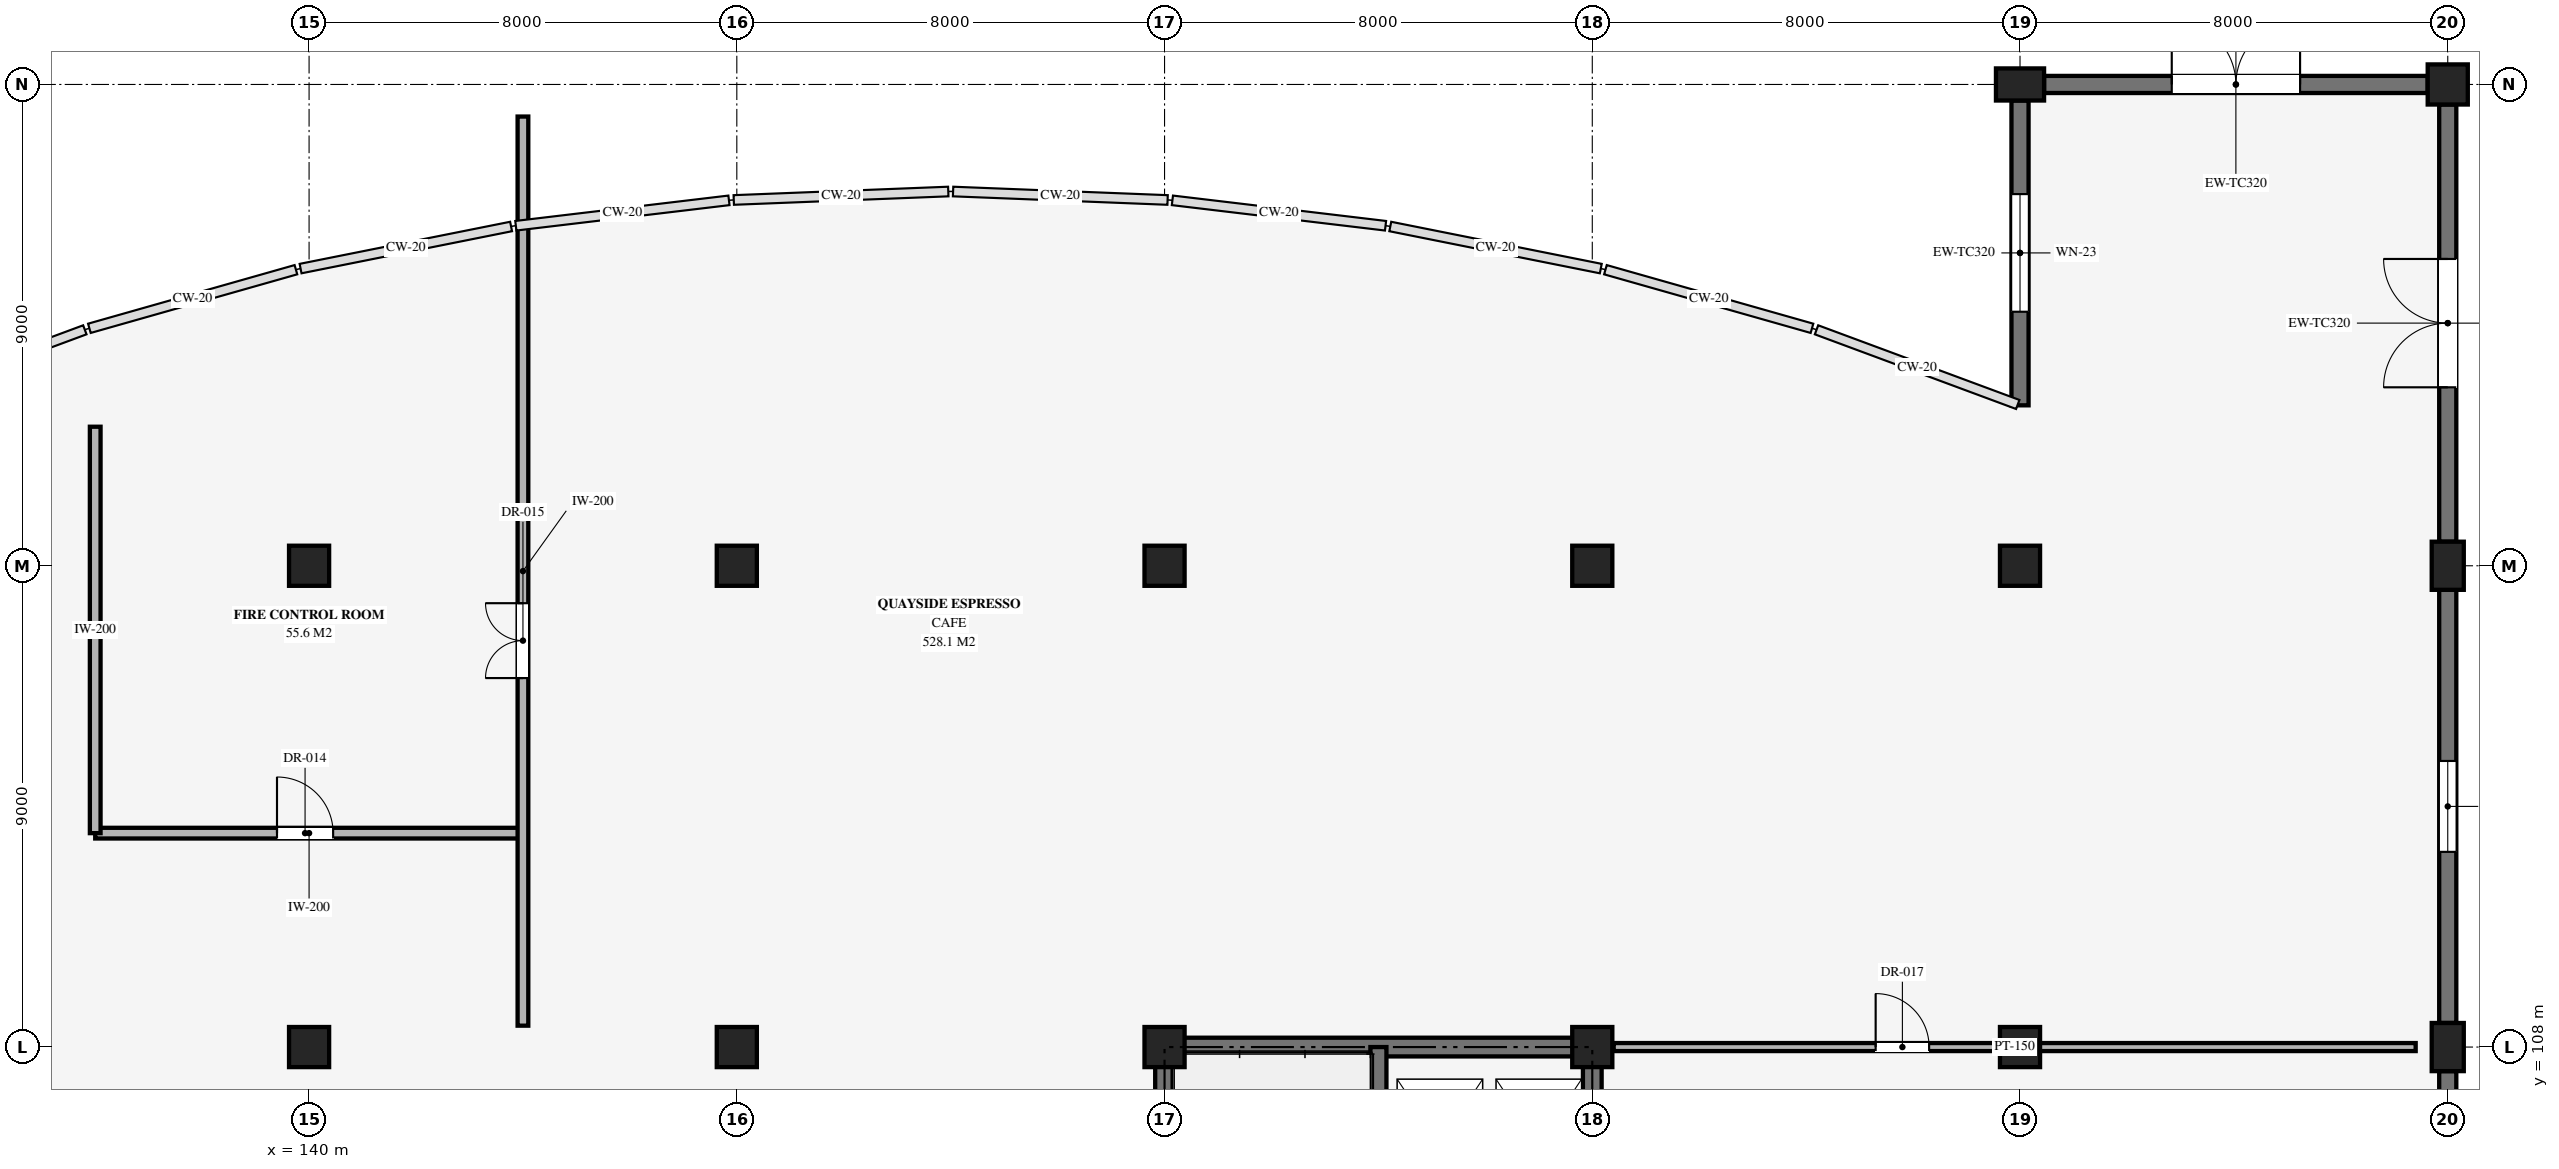
"""IFC4 building model, lengths in metres.
Left out: names, types, materials, properties, quantities, classifications, styles, units other than length and angle.
Written with IfcOpenShell. Run it as: python <this file> out.ifc"""

import sys

from ifc_helpers import new_model, si_unit, direction, frame, frame_2d, origin, origin_2d, place, context, subcontext, project, spatial, rectangle, extrude, element, fill, save


model = new_model("IFC4")
c1 = context("Model", 3, precision=1e-05, world=origin(), true_north=direction((0.0, 1.0)))
c2 = subcontext(c1, "Body", "Model", "MODEL_VIEW")
j1 = project(units=[si_unit("LENGTHUNIT", "METRE"), si_unit("PLANEANGLEUNIT", "RADIAN")], contexts=[c1])
p1 = place(None, origin())
s1 = spatial("IfcSite", under=j1, at=p1, CompositionType="ELEMENT")
p2 = place(p1, origin())
s2 = spatial("IfcBuilding", under=s1, at=p2, CompositionType="ELEMENT")
p3 = place(p2, origin())
s3 = spatial("IfcBuildingStorey", under=s2, at=p3, CompositionType="ELEMENT", Elevation=0.0)
for number, where, z_axis, x_axis in (
    (1, (140.0, 108.0, 0.0), (0.0, 0.0, 1.0), (1.0, 0.0, 0.0)),
    (2, (140.0, 117.0, 0.0), (0.0, 0.0, 1.0), (1.0, 0.0, 0.0)),
    (3, (148.0, 108.0, 0.0), (0.0, 0.0, 1.0), (1.0, 0.0, 0.0)),
    (4, (148.0, 117.0, 0.0), (0.0, 0.0, 1.0), (1.0, 0.0, 0.0)),
    (5, (156.0, 108.0, 0.0), (0.0, 0.0, 1.0), (1.0, 0.0, 0.0)),
    (6, (156.0, 117.0, 0.0), (0.0, 0.0, 1.0), (1.0, 0.0, 0.0)),
    (7, (164.0, 108.0, 0.0), (0.0, 0.0, 1.0), (1.0, 0.0, 0.0)),
    (8, (164.0, 117.0, 0.0), (0.0, 0.0, 1.0), (1.0, 0.0, 0.0)),
    (9, (172.0, 108.0, 0.0), (0.0, 0.0, 1.0), (1.0, 0.0, 0.0)),
    (10, (172.0, 117.0, 0.0), (0.0, 0.0, 1.0), (1.0, 0.0, 0.0)),
):
    element("IfcColumn", number, at=place(p3, frame(where, z_axis=z_axis, x_axis=x_axis)), inside=s3, PredefinedType="COLUMN", context=c2, shape_type="SweptSolid", body=[
        extrude(rectangle(XDim=0.75, YDim=0.75, at=origin_2d()), origin(), (0.0, 0.0, 1.0), 5.24),
    ])
for number, where, z_axis, x_axis in (
    (11, (172.0, 126.0, 0.0), (0.0, 0.0, 1.0), (0.0, 1.0, 0.0)),
    (12, (180.0, 108.0, 0.0), (0.0, 0.0, 1.0), (1.0, 0.0, 0.0)),
    (13, (180.0, 117.0, 0.0), (0.0, 0.0, 1.0), (1.0, 0.0, 0.0)),
):
    element("IfcColumn", number, at=place(p3, frame(where, z_axis=z_axis, x_axis=x_axis)), inside=s3, PredefinedType="PILASTER", context=c2, shape_type="SweptSolid", body=[
        extrude(rectangle(XDim=0.6, YDim=0.9, at=origin_2d()), origin(), (0.0, 0.0, 1.0), 5.24),
    ])
p4 = place(p3, frame((180.0, 126.0, 0.0), z_axis=(0.0, 0.0, 1.0), x_axis=(1.0, 0.0, 0.0)))
e14 = element("IfcColumn", 14, at=p4, inside=s3, PredefinedType="COLUMN", context=c2, shape_type="SweptSolid", body=[
    extrude(rectangle(XDim=0.75, YDim=0.75, at=origin_2d()), origin(), (0.0, 0.0, 1.0), 5.24),
])
p5 = place(p3, frame((172.45, 126.0, 0.0), z_axis=(0.0, 0.0, 1.0), x_axis=(1.0, 0.0, 0.0)))
e15 = element("IfcWall", 15, at=p5, inside=s3, PredefinedType="SOLIDWALL", context=c2, shape_type="SweptSolid", body=[
    extrude(rectangle(XDim=7.175, YDim=0.32, at=frame_2d((3.587, 0.0))), origin(), (0.0, 0.0, 1.0), 5.06),
])
p6 = place(p5, frame((2.388, 0.0, 0.0)))
e16 = element("IfcOpeningElement", 16, at=p6, cuts=e15, PredefinedType="OPENING", context=c2, shape_type="SweptSolid", body=[
    extrude(rectangle(XDim=2.4, YDim=2.3, at=frame_2d((1.2, 1.15))), frame((0.0, 0.17, 0.0), z_axis=(0.0, -1.0, 0.0), x_axis=(1.0, 0.0, 0.0)), (0.0, 0.0, 1.0), 0.34),
])
p7 = place(p3, frame((172.0, 120.0, 0.0), z_axis=(0.0, 0.0, 1.0), x_axis=(0.0, 1.0, 0.0)))
e17 = element("IfcWall", 17, at=p7, inside=s3, PredefinedType="SOLIDWALL", context=c2, shape_type="SweptSolid", body=[
    extrude(rectangle(XDim=5.7, YDim=0.32, at=frame_2d((2.85, 0.0))), origin(), (0.0, 0.0, 1.0), 5.06),
])
p8 = place(p7, frame((1.75, 0.0, 1.0)))
e18 = element("IfcOpeningElement", 18, at=p8, cuts=e17, PredefinedType="OPENING", context=c2, shape_type="SweptSolid", body=[
    extrude(rectangle(XDim=2.2, YDim=1.9, at=frame_2d((1.1, 0.95))), frame((0.0, 0.17, 0.0), z_axis=(0.0, -1.0, 0.0), x_axis=(1.0, 0.0, 0.0)), (0.0, 0.0, 1.0), 0.34),
])
p9 = place(p3, frame((180.0, 107.55, 0.0), z_axis=(0.0, 0.0, 1.0), x_axis=(0.0, -1.0, 0.0)))
e19 = element("IfcWall", 19, at=p9, inside=s3, PredefinedType="SOLIDWALL", context=c2, shape_type="SweptSolid", body=[
    extrude(rectangle(XDim=8.1, YDim=0.32, at=frame_2d((4.05, 0.0))), origin(), (0.0, 0.0, 1.0), 5.06),
])
p10 = place(p9, frame((2.85, 0.0, 0.0)))
e20 = element("IfcOpeningElement", 20, at=p10, cuts=e19, PredefinedType="OPENING", context=c2, shape_type="SweptSolid", body=[
    extrude(rectangle(XDim=2.4, YDim=2.3, at=frame_2d((1.2, 1.15))), frame((0.0, 0.17, 0.0), z_axis=(0.0, -1.0, 0.0), x_axis=(1.0, 0.0, 0.0)), (0.0, 0.0, 1.0), 0.34),
])
p11 = place(p3, frame((180.0, 108.45, 0.0), z_axis=(0.0, 0.0, 1.0), x_axis=(0.0, 1.0, 0.0)))
e21 = element("IfcWall", 21, at=p11, inside=s3, PredefinedType="SOLIDWALL", context=c2, shape_type="SweptSolid", body=[
    extrude(rectangle(XDim=8.1, YDim=0.32, at=frame_2d((4.05, 0.0))), origin(), (0.0, 0.0, 1.0), 5.06),
])
p12 = place(p11, frame((3.2, 0.0, 1.0)))
e22 = element("IfcOpeningElement", 22, at=p12, cuts=e21, PredefinedType="OPENING", context=c2, shape_type="SweptSolid", body=[
    extrude(rectangle(XDim=1.7, YDim=1.7, at=frame_2d((0.85, 0.85))), frame((0.0, 0.17, 0.0), z_axis=(0.0, -1.0, 0.0), x_axis=(1.0, 0.0, 0.0)), (0.0, 0.0, 1.0), 0.34),
])
p13 = place(p3, frame((180.0, 117.45, 0.0), z_axis=(0.0, 0.0, 1.0), x_axis=(0.0, 1.0, 0.0)))
e23 = element("IfcWall", 23, at=p13, inside=s3, PredefinedType="SOLIDWALL", context=c2, shape_type="SweptSolid", body=[
    extrude(rectangle(XDim=8.175, YDim=0.32, at=frame_2d((4.087, 0.0))), origin(), (0.0, 0.0, 1.0), 5.06),
])
p14 = place(p13, frame((2.887, 0.0, 0.0)))
e24 = element("IfcOpeningElement", 24, at=p14, cuts=e23, PredefinedType="OPENING", context=c2, shape_type="SweptSolid", body=[
    extrude(rectangle(XDim=2.4, YDim=2.3, at=frame_2d((1.2, 1.15))), frame((0.0, 0.17, 0.0), z_axis=(0.0, -1.0, 0.0), x_axis=(1.0, 0.0, 0.0)), (0.0, 0.0, 1.0), 0.34),
])
p15 = place(p3, frame((156.0, 108.0, 0.0), z_axis=(0.0, 0.0, 1.0), x_axis=(1.0, 0.0, 0.0)))
e25 = element("IfcWall", 25, at=p15, inside=s3, PredefinedType="SHEAR", context=c2, shape_type="SweptSolid", body=[
    extrude(rectangle(XDim=8.0, YDim=0.35, at=frame_2d((4.0, 0.0))), origin(), (0.0, 0.0, 1.0), 5.38),
])
p16 = place(p3, frame((156.0, 99.0, 0.0), z_axis=(0.0, 0.0, 1.0), x_axis=(0.0, 1.0, 0.0)))
e26 = element("IfcWall", 26, at=p16, inside=s3, PredefinedType="SHEAR", context=c2, shape_type="SweptSolid", body=[
    extrude(rectangle(XDim=9.0, YDim=0.35, at=frame_2d((4.5, 0.0))), origin(), (0.0, 0.0, 1.0), 5.38),
])
p17 = place(p3, frame((164.0, 99.0, 0.0), z_axis=(0.0, 0.0, 1.0), x_axis=(0.0, 1.0, 0.0)))
e27 = element("IfcWall", 27, at=p17, inside=s3, PredefinedType="SHEAR", context=c2, shape_type="SweptSolid", body=[
    extrude(rectangle(XDim=9.0, YDim=0.35, at=frame_2d((4.5, 0.0))), origin(), (0.0, 0.0, 1.0), 5.38),
])
p18 = place(p17, frame((1.4, 0.0, 0.0)))
e28 = element("IfcOpeningElement", 28, at=p18, cuts=e27, PredefinedType="OPENING", context=c2, shape_type="SweptSolid", body=[
    extrude(rectangle(XDim=1.5, YDim=2.2, at=frame_2d((0.75, 1.1))), frame((0.0, 0.185, 0.0), z_axis=(0.0, -1.0, 0.0), x_axis=(1.0, 0.0, 0.0)), (0.0, 0.0, 1.0), 0.37),
])
p19 = place(p3, frame((160.0, 108.0, 0.0), z_axis=(0.0, 0.0, 1.0), x_axis=(0.0, -1.0, 0.0)))
e29 = element("IfcWall", 29, at=p19, inside=s3, PredefinedType="SHEAR", context=c2, shape_type="SweptSolid", body=[
    extrude(rectangle(XDim=9.0, YDim=0.3, at=frame_2d((4.5, 0.0))), origin(), (0.0, 0.0, 1.0), 5.38),
])
p20 = place(p19, frame((7.45, 0.0, 0.0)))
e30 = element("IfcOpeningElement", 30, at=p20, cuts=e29, PredefinedType="OPENING", context=c2, shape_type="SweptSolid", body=[
    extrude(rectangle(XDim=1.05, YDim=2.15, at=frame_2d((0.525, 1.075))), frame((0.0, 0.16, 0.0), z_axis=(0.0, -1.0, 0.0), x_axis=(1.0, 0.0, 0.0)), (0.0, 0.0, 1.0), 0.32),
])
p21 = place(p3, frame((136.0, 112.0, 0.0), z_axis=(0.0, 0.0, 1.0), x_axis=(1.0, 0.0, 0.0)))
e31 = element("IfcWall", 31, at=p21, inside=s3, PredefinedType="SOLIDWALL", context=c2, shape_type="SweptSolid", body=[
    extrude(rectangle(XDim=8.0, YDim=0.2, at=frame_2d((4.0, 0.0))), origin(), (0.0, 0.0, 1.0), 4.2),
])
p22 = place(p21, frame((3.4, 0.0, 0.0)))
e32 = element("IfcOpeningElement", 32, at=p22, cuts=e31, PredefinedType="OPENING", context=c2, shape_type="SweptSolid", body=[
    extrude(rectangle(XDim=1.05, YDim=2.15, at=frame_2d((0.525, 1.075))), frame((0.0, 0.11, 0.0), z_axis=(0.0, -1.0, 0.0), x_axis=(1.0, 0.0, 0.0)), (0.0, 0.0, 1.0), 0.22),
])
p23 = place(p3, frame((136.0, 112.0, 0.0), z_axis=(0.0, 0.0, 1.0), x_axis=(0.0, 1.0, 0.0)))
e33 = element("IfcWall", 33, at=p23, inside=s3, PredefinedType="SOLIDWALL", context=c2, shape_type="SweptSolid", body=[
    extrude(rectangle(XDim=7.6, YDim=0.2, at=frame_2d((3.8, 0.0))), origin(), (0.0, 0.0, 1.0), 4.2),
])
p24 = place(p3, frame((144.0, 108.4, 0.0), z_axis=(0.0, 0.0, 1.0), x_axis=(0.0, 1.0, 0.0)))
e34 = element("IfcWall", 34, at=p24, inside=s3, PredefinedType="SOLIDWALL", context=c2, shape_type="SweptSolid", body=[
    extrude(rectangle(XDim=17.0, YDim=0.2, at=frame_2d((8.5, 0.0))), origin(), (0.0, 0.0, 1.0), 4.2),
])
p25 = place(p24, frame((6.5, 0.0, 0.0)))
e35 = element("IfcOpeningElement", 35, at=p25, cuts=e34, PredefinedType="OPENING", context=c2, shape_type="SweptSolid", body=[
    extrude(rectangle(XDim=1.4, YDim=2.15, at=frame_2d((0.7, 1.075))), frame((0.0, 0.11, 0.0), z_axis=(0.0, -1.0, 0.0), x_axis=(1.0, 0.0, 0.0)), (0.0, 0.0, 1.0), 0.22),
])
p26 = place(p3, frame((164.4, 108.0, 0.0), z_axis=(0.0, 0.0, 1.0), x_axis=(1.0, 0.0, 0.0)))
e36 = element("IfcWall", 36, at=p26, inside=s3, PredefinedType="PARTITIONING", context=c2, shape_type="SweptSolid", body=[
    extrude(rectangle(XDim=15.0, YDim=0.15, at=frame_2d((7.5, 0.0))), origin(), (0.0, 0.0, 1.0), 4.2),
])
p27 = place(p26, frame((4.9, 0.0, 0.0)))
e37 = element("IfcOpeningElement", 37, at=p27, cuts=e36, PredefinedType="OPENING", context=c2, shape_type="SweptSolid", body=[
    extrude(rectangle(XDim=1.0, YDim=2.15, at=frame_2d((0.5, 1.075))), frame((0.0, 0.085, 0.0), z_axis=(0.0, -1.0, 0.0), x_axis=(1.0, 0.0, 0.0)), (0.0, 0.0, 1.0), 0.17),
])
p28 = place(p6, origin())
e38 = element("IfcDoor", 38, at=p28, inside=s3, OperationType="DOUBLE_DOOR_SINGLE_SWING", PredefinedType="DOOR", context=c2, shape_type="SweptSolid", body=[
    extrude(rectangle(XDim=2.4, YDim=2.3, at=frame_2d((1.2, 1.15))), frame((0.0, 0.025, 0.0), z_axis=(0.0, -1.0, 0.0), x_axis=(1.0, 0.0, 0.0)), (0.0, 0.0, 1.0), 0.05),
])
fill(e16, e38)
p29 = place(p8, origin())
e39 = element("IfcWindow", 39, at=p29, inside=s3, PartitioningType="SINGLE_PANEL", PredefinedType="WINDOW", context=c2, shape_type="SweptSolid", body=[
    extrude(rectangle(XDim=2.2, YDim=1.9, at=frame_2d((1.1, 0.95))), frame((0.0, 0.03, 0.0), z_axis=(0.0, -1.0, 0.0), x_axis=(1.0, 0.0, 0.0)), (0.0, 0.0, 1.0), 0.06),
])
fill(e18, e39)
p30 = place(p12, origin())
e40 = element("IfcWindow", 40, at=p30, inside=s3, PartitioningType="SINGLE_PANEL", PredefinedType="WINDOW", context=c2, shape_type="SweptSolid", body=[
    extrude(rectangle(XDim=1.7, YDim=1.7, at=frame_2d((0.85, 0.85))), frame((0.0, 0.03, 0.0), z_axis=(0.0, -1.0, 0.0), x_axis=(1.0, 0.0, 0.0)), (0.0, 0.0, 1.0), 0.06),
])
fill(e22, e40)
p31 = place(p14, origin())
e41 = element("IfcDoor", 41, at=p31, inside=s3, OperationType="DOUBLE_DOOR_SINGLE_SWING", PredefinedType="DOOR", context=c2, shape_type="SweptSolid", body=[
    extrude(rectangle(XDim=2.4, YDim=2.3, at=frame_2d((1.2, 1.15))), frame((0.0, 0.025, 0.0), z_axis=(0.0, -1.0, 0.0), x_axis=(1.0, 0.0, 0.0)), (0.0, 0.0, 1.0), 0.05),
])
fill(e24, e41)
p32 = place(p22, origin())
e42 = element("IfcDoor", 42, at=p32, inside=s3, OperationType="SINGLE_SWING_LEFT", PredefinedType="DOOR", context=c2, shape_type="SweptSolid", body=[
    extrude(rectangle(XDim=1.05, YDim=2.15, at=frame_2d((0.525, 1.075))), frame((0.0, 0.025, 0.0), z_axis=(0.0, -1.0, 0.0), x_axis=(1.0, 0.0, 0.0)), (0.0, 0.0, 1.0), 0.05),
])
fill(e32, e42)
p33 = place(p25, origin())
e43 = element("IfcDoor", 43, at=p33, inside=s3, OperationType="DOUBLE_DOOR_SINGLE_SWING", PredefinedType="DOOR", context=c2, shape_type="SweptSolid", body=[
    extrude(rectangle(XDim=1.4, YDim=2.15, at=frame_2d((0.7, 1.075))), frame((0.0, 0.025, 0.0), z_axis=(0.0, -1.0, 0.0), x_axis=(1.0, 0.0, 0.0)), (0.0, 0.0, 1.0), 0.05),
])
fill(e35, e43)
p34 = place(p27, origin())
e44 = element("IfcDoor", 44, at=p34, inside=s3, OperationType="SINGLE_SWING_LEFT", PredefinedType="DOOR", context=c2, shape_type="SweptSolid", body=[
    extrude(rectangle(XDim=1.0, YDim=2.15, at=frame_2d((0.5, 1.075))), frame((0.0, 0.025, 0.0), z_axis=(0.0, -1.0, 0.0), x_axis=(1.0, 0.0, 0.0)), (0.0, 0.0, 1.0), 0.05),
])
fill(e37, e44)
save(model, sys.argv[1])
